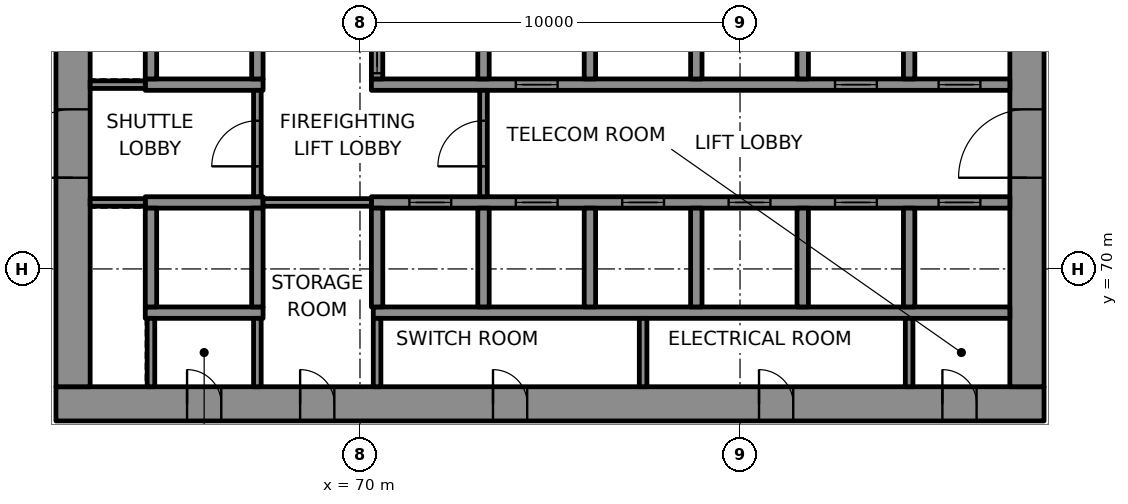
"""IFC4 building model, lengths in metres.
Left out: names, types, materials, properties, quantities, classifications, styles, units other than length and angle.
Written with IfcOpenShell. Run it as: python <this file> out.ifc"""

import sys

from ifc_helpers import new_model, si_unit, direction, frame, frame_2d, origin, place, context, subcontext, project, spatial, rectangle, extrude, element, fill, save


model = new_model("IFC4")
c1 = context("Model", 3, precision=1e-05, world=origin(), true_north=direction((0.0, 1.0)))
c2 = subcontext(c1, "Body", "Model", "MODEL_VIEW")
j1 = project(units=[si_unit("LENGTHUNIT", "METRE"), si_unit("PLANEANGLEUNIT", "RADIAN")], contexts=[c1])
p1 = place(None, origin())
s1 = spatial("IfcSite", under=j1, at=p1, CompositionType="ELEMENT")
p2 = place(p1, origin())
s2 = spatial("IfcBuilding", under=s1, at=p2, CompositionType="ELEMENT")
p3 = place(p2, frame((0.0, 0.0, 136.6)))
s3 = spatial("IfcBuildingStorey", under=s2, at=p3, CompositionType="ELEMENT", Elevation=136.6)
p4 = place(p3, frame((62.0, 66.45, 0.0), z_axis=(0.0, 0.0, 1.0), x_axis=(1.0, 0.0, 0.0)))
e1 = element("IfcWall", 1, at=p4, inside=s3, PredefinedType="SHEAR", context=c2, shape_type="SweptSolid", body=[
    extrude(rectangle(XDim=26.0, YDim=0.9, at=frame_2d((13.0, 0.0))), origin(), (0.0, 0.0, 1.0), 3.9),
])
p5 = place(p4, frame((3.45, 0.0, 0.0)))
e2 = element("IfcOpeningElement", 2, at=p5, cuts=e1, PredefinedType="OPENING", context=c2, shape_type="SweptSolid", body=[
    extrude(rectangle(XDim=0.9, YDim=2.1, at=frame_2d((0.45, 1.05))), frame((0.0, 0.46, 0.0), z_axis=(0.0, -1.0, 0.0), x_axis=(1.0, 0.0, 0.0)), (0.0, 0.0, 1.0), 0.92),
])
p6 = place(p4, frame((6.425, 0.0, 0.0)))
e3 = element("IfcOpeningElement", 3, at=p6, cuts=e1, PredefinedType="OPENING", context=c2, shape_type="SweptSolid", body=[
    extrude(rectangle(XDim=0.9, YDim=2.1, at=frame_2d((0.45, 1.05))), frame((0.0, 0.46, 0.0), z_axis=(0.0, -1.0, 0.0), x_axis=(1.0, 0.0, 0.0)), (0.0, 0.0, 1.0), 0.92),
])
p7 = place(p4, frame((11.5, 0.0, 0.0)))
e4 = element("IfcOpeningElement", 4, at=p7, cuts=e1, PredefinedType="OPENING", context=c2, shape_type="SweptSolid", body=[
    extrude(rectangle(XDim=0.9, YDim=2.1, at=frame_2d((0.45, 1.05))), frame((0.0, 0.46, 0.0), z_axis=(0.0, -1.0, 0.0), x_axis=(1.0, 0.0, 0.0)), (0.0, 0.0, 1.0), 0.92),
])
p8 = place(p4, frame((18.5, 0.0, 0.0)))
e5 = element("IfcOpeningElement", 5, at=p8, cuts=e1, PredefinedType="OPENING", context=c2, shape_type="SweptSolid", body=[
    extrude(rectangle(XDim=0.9, YDim=2.1, at=frame_2d((0.45, 1.05))), frame((0.0, 0.46, 0.0), z_axis=(0.0, -1.0, 0.0), x_axis=(1.0, 0.0, 0.0)), (0.0, 0.0, 1.0), 0.92),
])
p9 = place(p4, frame((23.325, 0.0, 0.0)))
e6 = element("IfcOpeningElement", 6, at=p9, cuts=e1, PredefinedType="OPENING", context=c2, shape_type="SweptSolid", body=[
    extrude(rectangle(XDim=0.9, YDim=2.1, at=frame_2d((0.45, 1.05))), frame((0.0, 0.46, 0.0), z_axis=(0.0, -1.0, 0.0), x_axis=(1.0, 0.0, 0.0)), (0.0, 0.0, 1.0), 0.92),
])
p10 = place(p3, frame((62.45, 66.9, 0.0), z_axis=(0.0, 0.0, 1.0), x_axis=(0.0, 1.0, 0.0)))
e7 = element("IfcWall", 7, at=p10, inside=s3, PredefinedType="SHEAR", context=c2, shape_type="SweptSolid", body=[
    extrude(rectangle(XDim=16.2, YDim=0.9, at=frame_2d((8.1, 0.0))), origin(), (0.0, 0.0, 1.0), 3.9),
])
p11 = place(p10, frame((5.5, 0.0, 0.0)))
e8 = element("IfcOpeningElement", 8, at=p11, cuts=e7, PredefinedType="OPENING", context=c2, shape_type="SweptSolid", body=[
    extrude(rectangle(XDim=1.8, YDim=2.1, at=frame_2d((0.9, 1.05))), frame((0.0, 0.46, 0.0), z_axis=(0.0, -1.0, 0.0), x_axis=(1.0, 0.0, 0.0)), (0.0, 0.0, 1.0), 0.92),
])
p12 = place(p3, frame((87.55, 66.9, 0.0), z_axis=(0.0, 0.0, 1.0), x_axis=(0.0, 1.0, 0.0)))
e9 = element("IfcWall", 9, at=p12, inside=s3, PredefinedType="SHEAR", context=c2, shape_type="SweptSolid", body=[
    extrude(rectangle(XDim=16.2, YDim=0.9, at=frame_2d((8.1, 0.0))), origin(), (0.0, 0.0, 1.0), 3.9),
])
p13 = place(p12, frame((5.5, 0.0, 0.0)))
e10 = element("IfcOpeningElement", 10, at=p13, cuts=e9, PredefinedType="OPENING", context=c2, shape_type="SweptSolid", body=[
    extrude(rectangle(XDim=1.8, YDim=2.1, at=frame_2d((0.9, 1.05))), frame((0.0, 0.46, 0.0), z_axis=(0.0, -1.0, 0.0), x_axis=(1.0, 0.0, 0.0)), (0.0, 0.0, 1.0), 0.92),
])
p14 = place(p12, frame((12.272, 0.0, 0.0)))
e11 = element("IfcOpeningElement", 11, at=p14, cuts=e9, PredefinedType="OPENING", context=c2, shape_type="SweptSolid", body=[
    extrude(rectangle(XDim=0.9, YDim=2.1, at=frame_2d((0.45, 1.05))), frame((0.0, 0.46, 0.0), z_axis=(0.0, -1.0, 0.0), x_axis=(1.0, 0.0, 0.0)), (0.0, 0.0, 1.0), 0.92),
])
p15 = place(p3, frame((64.35, 68.85, 0.0), z_axis=(0.0, 0.0, 1.0), x_axis=(1.0, 0.0, 0.0)))
e12 = element("IfcWall", 12, at=p15, inside=s3, PredefinedType="SHEAR", context=c2, shape_type="SweptSolid", body=[
    extrude(rectangle(XDim=3.1, YDim=0.3, at=frame_2d((1.55, 0.0))), origin(), (0.0, 0.0, 1.0), 3.9),
])
p16 = place(p3, frame((70.35, 68.85, 0.0), z_axis=(0.0, 0.0, 1.0), x_axis=(1.0, 0.0, 0.0)))
e13 = element("IfcWall", 13, at=p16, inside=s3, PredefinedType="SHEAR", context=c2, shape_type="SweptSolid", body=[
    extrude(rectangle(XDim=16.75, YDim=0.3, at=frame_2d((8.375, 0.0))), origin(), (0.0, 0.0, 1.0), 3.9),
])
p17 = place(p3, frame((64.35, 71.75, 0.0), z_axis=(0.0, 0.0, 1.0), x_axis=(1.0, 0.0, 0.0)))
e14 = element("IfcWall", 14, at=p17, inside=s3, PredefinedType="SHEAR", context=c2, shape_type="SweptSolid", body=[
    extrude(rectangle(XDim=3.1, YDim=0.3, at=frame_2d((1.55, 0.0))), origin(), (0.0, 0.0, 1.0), 3.9),
])
p18 = place(p3, frame((70.3, 71.75, 0.0), z_axis=(0.0, 0.0, 1.0), x_axis=(1.0, 0.0, 0.0)))
e15 = element("IfcWall", 15, at=p18, inside=s3, PredefinedType="SHEAR", context=c2, shape_type="SweptSolid", body=[
    extrude(rectangle(XDim=16.8, YDim=0.3, at=frame_2d((8.4, 0.0))), origin(), (0.0, 0.0, 1.0), 3.9),
])
p19 = place(p18, frame((1.0, 0.0, 0.0)))
e16 = element("IfcOpeningElement", 16, at=p19, cuts=e15, PredefinedType="OPENING", context=c2, shape_type="SweptSolid", body=[
    extrude(rectangle(XDim=1.1, YDim=2.1, at=frame_2d((0.55, 1.05))), frame((0.0, 0.16, 0.0), z_axis=(0.0, -1.0, 0.0), x_axis=(1.0, 0.0, 0.0)), (0.0, 0.0, 1.0), 0.32),
])
p20 = place(p18, frame((3.8, 0.0, 0.0)))
e17 = element("IfcOpeningElement", 17, at=p20, cuts=e15, PredefinedType="OPENING", context=c2, shape_type="SweptSolid", body=[
    extrude(rectangle(XDim=1.1, YDim=2.1, at=frame_2d((0.55, 1.05))), frame((0.0, 0.16, 0.0), z_axis=(0.0, -1.0, 0.0), x_axis=(1.0, 0.0, 0.0)), (0.0, 0.0, 1.0), 0.32),
])
p21 = place(p18, frame((6.6, 0.0, 0.0)))
e18 = element("IfcOpeningElement", 18, at=p21, cuts=e15, PredefinedType="OPENING", context=c2, shape_type="SweptSolid", body=[
    extrude(rectangle(XDim=1.1, YDim=2.1, at=frame_2d((0.55, 1.05))), frame((0.0, 0.16, 0.0), z_axis=(0.0, -1.0, 0.0), x_axis=(1.0, 0.0, 0.0)), (0.0, 0.0, 1.0), 0.32),
])
p22 = place(p18, frame((9.4, 0.0, 0.0)))
e19 = element("IfcOpeningElement", 19, at=p22, cuts=e15, PredefinedType="OPENING", context=c2, shape_type="SweptSolid", body=[
    extrude(rectangle(XDim=1.1, YDim=2.1, at=frame_2d((0.55, 1.05))), frame((0.0, 0.16, 0.0), z_axis=(0.0, -1.0, 0.0), x_axis=(1.0, 0.0, 0.0)), (0.0, 0.0, 1.0), 0.32),
])
p23 = place(p18, frame((12.2, 0.0, 0.0)))
e20 = element("IfcOpeningElement", 20, at=p23, cuts=e15, PredefinedType="OPENING", context=c2, shape_type="SweptSolid", body=[
    extrude(rectangle(XDim=1.1, YDim=2.1, at=frame_2d((0.55, 1.05))), frame((0.0, 0.16, 0.0), z_axis=(0.0, -1.0, 0.0), x_axis=(1.0, 0.0, 0.0)), (0.0, 0.0, 1.0), 0.32),
])
p24 = place(p18, frame((14.925, 0.0, 0.0)))
e21 = element("IfcOpeningElement", 21, at=p24, cuts=e15, PredefinedType="OPENING", context=c2, shape_type="SweptSolid", body=[
    extrude(rectangle(XDim=1.1, YDim=2.1, at=frame_2d((0.55, 1.05))), frame((0.0, 0.16, 0.0), z_axis=(0.0, -1.0, 0.0), x_axis=(1.0, 0.0, 0.0)), (0.0, 0.0, 1.0), 0.32),
])
p25 = place(p3, frame((64.35, 74.85, 0.0), z_axis=(0.0, 0.0, 1.0), x_axis=(1.0, 0.0, 0.0)))
e22 = element("IfcWall", 22, at=p25, inside=s3, PredefinedType="SHEAR", context=c2, shape_type="SweptSolid", body=[
    extrude(rectangle(XDim=3.1, YDim=0.3, at=frame_2d((1.55, 0.0))), origin(), (0.0, 0.0, 1.0), 3.9),
])
p26 = place(p3, frame((70.3, 74.85, 0.0), z_axis=(0.0, 0.0, 1.0), x_axis=(1.0, 0.0, 0.0)))
e23 = element("IfcWall", 23, at=p26, inside=s3, PredefinedType="SHEAR", context=c2, shape_type="SweptSolid", body=[
    extrude(rectangle(XDim=16.8, YDim=0.3, at=frame_2d((8.4, 0.0))), origin(), (0.0, 0.0, 1.0), 3.9),
])
p27 = place(p26, frame((3.8, 0.0, 0.0)))
e24 = element("IfcOpeningElement", 24, at=p27, cuts=e23, PredefinedType="OPENING", context=c2, shape_type="SweptSolid", body=[
    extrude(rectangle(XDim=1.1, YDim=2.1, at=frame_2d((0.55, 1.05))), frame((0.0, 0.16, 0.0), z_axis=(0.0, -1.0, 0.0), x_axis=(1.0, 0.0, 0.0)), (0.0, 0.0, 1.0), 0.32),
])
p28 = place(p26, frame((12.2, 0.0, 0.0)))
e25 = element("IfcOpeningElement", 25, at=p28, cuts=e23, PredefinedType="OPENING", context=c2, shape_type="SweptSolid", body=[
    extrude(rectangle(XDim=1.1, YDim=2.1, at=frame_2d((0.55, 1.05))), frame((0.0, 0.16, 0.0), z_axis=(0.0, -1.0, 0.0), x_axis=(1.0, 0.0, 0.0)), (0.0, 0.0, 1.0), 0.32),
])
p29 = place(p26, frame((14.925, 0.0, 0.0)))
e26 = element("IfcOpeningElement", 26, at=p29, cuts=e23, PredefinedType="OPENING", context=c2, shape_type="SweptSolid", body=[
    extrude(rectangle(XDim=1.1, YDim=2.1, at=frame_2d((0.55, 1.05))), frame((0.0, 0.16, 0.0), z_axis=(0.0, -1.0, 0.0), x_axis=(1.0, 0.0, 0.0)), (0.0, 0.0, 1.0), 0.32),
])
for number, where, z_axis, x_axis in (
    (27, (64.5, 69.0, 0.0), (0.0, 0.0, 1.0), (0.0, 1.0, 0.0)),
    (28, (64.5, 75.0, 0.0), (0.0, 0.0, 1.0), (0.0, 1.0, 0.0)),
    (29, (67.3, 69.0, 0.0), (0.0, 0.0, 1.0), (0.0, 1.0, 0.0)),
    (30, (67.3, 75.0, 0.0), (0.0, 0.0, 1.0), (0.0, 1.0, 0.0)),
    (31, (70.45, 69.0, 0.0), (0.0, 0.0, 1.0), (0.0, 1.0, 0.0)),
):
    element("IfcWall", number, at=place(p3, frame(where, z_axis=z_axis, x_axis=x_axis)), inside=s3, PredefinedType="SHEAR", context=c2, shape_type="SweptSolid", body=[
        extrude(rectangle(XDim=2.6, YDim=0.3, at=frame_2d((1.3, 0.0))), origin(), (0.0, 0.0, 1.0), 3.9),
    ])
p30 = place(p3, frame((70.45, 75.0, 0.0), z_axis=(0.0, 0.0, 1.0), x_axis=(0.0, 1.0, 0.0)))
e32 = element("IfcWall", 32, at=p30, inside=s3, PredefinedType="SHEAR", context=c2, shape_type="SweptSolid", body=[
    extrude(rectangle(XDim=2.6, YDim=0.3, at=frame_2d((1.3, 0.0))), origin(), (0.0, 0.0, 1.0), 3.9),
])
p31 = place(p30, frame((0.15, 0.0, 0.0)))
e33 = element("IfcOpeningElement", 33, at=p31, cuts=e32, PredefinedType="OPENING", context=c2, shape_type="SweptSolid", body=[
    extrude(rectangle(XDim=1.1, YDim=2.1, at=frame_2d((0.55, 1.05))), frame((0.0, 0.16, 0.0), z_axis=(0.0, -1.0, 0.0), x_axis=(1.0, 0.0, 0.0)), (0.0, 0.0, 1.0), 0.32),
])
for number, where, z_axis, x_axis in (
    (34, (73.25, 69.0, 0.0), (0.0, 0.0, 1.0), (0.0, 1.0, 0.0)),
    (35, (73.25, 75.0, 0.0), (0.0, 0.0, 1.0), (0.0, 1.0, 0.0)),
    (36, (76.05, 69.0, 0.0), (0.0, 0.0, 1.0), (0.0, 1.0, 0.0)),
    (37, (76.05, 75.0, 0.0), (0.0, 0.0, 1.0), (0.0, 1.0, 0.0)),
    (38, (78.85, 69.0, 0.0), (0.0, 0.0, 1.0), (0.0, 1.0, 0.0)),
    (39, (78.85, 75.0, 0.0), (0.0, 0.0, 1.0), (0.0, 1.0, 0.0)),
    (40, (81.65, 69.0, 0.0), (0.0, 0.0, 1.0), (0.0, 1.0, 0.0)),
    (41, (81.65, 75.0, 0.0), (0.0, 0.0, 1.0), (0.0, 1.0, 0.0)),
    (42, (84.45, 69.0, 0.0), (0.0, 0.0, 1.0), (0.0, 1.0, 0.0)),
    (43, (84.45, 75.0, 0.0), (0.0, 0.0, 1.0), (0.0, 1.0, 0.0)),
):
    element("IfcWall", number, at=place(p3, frame(where, z_axis=z_axis, x_axis=x_axis)), inside=s3, PredefinedType="SHEAR", context=c2, shape_type="SweptSolid", body=[
        extrude(rectangle(XDim=2.6, YDim=0.3, at=frame_2d((1.3, 0.0))), origin(), (0.0, 0.0, 1.0), 3.9),
    ])
p32 = place(p3, frame((62.9, 71.75, 0.0), z_axis=(0.0, 0.0, 1.0), x_axis=(1.0, 0.0, 0.0)))
e44 = element("IfcWall", 44, at=p32, inside=s3, PredefinedType="PARTITIONING", context=c2, shape_type="SweptSolid", body=[
    extrude(rectangle(XDim=1.45, YDim=0.2, at=frame_2d((0.725, 0.0))), origin(), (0.0, 0.0, 1.0), 3.9),
])
p33 = place(p3, frame((67.45, 71.75, 0.0), z_axis=(0.0, 0.0, 1.0), x_axis=(1.0, 0.0, 0.0)))
e45 = element("IfcWall", 45, at=p33, inside=s3, PredefinedType="PARTITIONING", context=c2, shape_type="SweptSolid", body=[
    extrude(rectangle(XDim=2.85, YDim=0.2, at=frame_2d((1.425, 0.0))), origin(), (0.0, 0.0, 1.0), 3.9),
])
p34 = place(p3, frame((62.9, 74.85, 0.0), z_axis=(0.0, 0.0, 1.0), x_axis=(1.0, 0.0, 0.0)))
e46 = element("IfcWall", 46, at=p34, inside=s3, PredefinedType="PARTITIONING", context=c2, shape_type="SweptSolid", body=[
    extrude(rectangle(XDim=1.45, YDim=0.2, at=frame_2d((0.725, 0.0))), origin(), (0.0, 0.0, 1.0), 3.9),
])
for number, where, z_axis, x_axis in (
    (47, (64.5, 66.9, 0.0), (0.0, 0.0, 1.0), (0.0, 1.0, 0.0)),
    (48, (67.3, 66.9, 0.0), (0.0, 0.0, 1.0), (0.0, 1.0, 0.0)),
):
    element("IfcWall", number, at=place(p3, frame(where, z_axis=z_axis, x_axis=x_axis)), inside=s3, PredefinedType="PARTITIONING", context=c2, shape_type="SweptSolid", body=[
        extrude(rectangle(XDim=1.8, YDim=0.2, at=frame_2d((0.9, 0.0))), origin(), (0.0, 0.0, 1.0), 3.9),
    ])
p35 = place(p3, frame((67.3, 71.9, 0.0), z_axis=(0.0, 0.0, 1.0), x_axis=(0.0, 1.0, 0.0)))
e49 = element("IfcWall", 49, at=p35, inside=s3, PredefinedType="PARTITIONING", context=c2, shape_type="SweptSolid", body=[
    extrude(rectangle(XDim=2.8, YDim=0.2, at=frame_2d((1.4, 0.0))), origin(), (0.0, 0.0, 1.0), 3.9),
])
p36 = place(p35, frame((0.8, 0.0, 0.0)))
e50 = element("IfcOpeningElement", 50, at=p36, cuts=e49, PredefinedType="OPENING", context=c2, shape_type="SweptSolid", body=[
    extrude(rectangle(XDim=1.2, YDim=2.1, at=frame_2d((0.6, 1.05))), frame((0.0, 0.11, 0.0), z_axis=(0.0, -1.0, 0.0), x_axis=(1.0, 0.0, 0.0)), (0.0, 0.0, 1.0), 0.22),
])
p37 = place(p3, frame((70.45, 66.9, 0.0), z_axis=(0.0, 0.0, 1.0), x_axis=(0.0, 1.0, 0.0)))
e51 = element("IfcWall", 51, at=p37, inside=s3, PredefinedType="PARTITIONING", context=c2, shape_type="SweptSolid", body=[
    extrude(rectangle(XDim=1.8, YDim=0.2, at=frame_2d((0.9, 0.0))), origin(), (0.0, 0.0, 1.0), 3.9),
])
p38 = place(p3, frame((73.25, 71.9, 0.0), z_axis=(0.0, 0.0, 1.0), x_axis=(0.0, 1.0, 0.0)))
e52 = element("IfcWall", 52, at=p38, inside=s3, PredefinedType="PARTITIONING", context=c2, shape_type="SweptSolid", body=[
    extrude(rectangle(XDim=2.8, YDim=0.2, at=frame_2d((1.4, 0.0))), origin(), (0.0, 0.0, 1.0), 3.9),
])
p39 = place(p38, frame((0.8, 0.0, 0.0)))
e53 = element("IfcOpeningElement", 53, at=p39, cuts=e52, PredefinedType="OPENING", context=c2, shape_type="SweptSolid", body=[
    extrude(rectangle(XDim=1.2, YDim=2.1, at=frame_2d((0.6, 1.05))), frame((0.0, 0.11, 0.0), z_axis=(0.0, -1.0, 0.0), x_axis=(1.0, 0.0, 0.0)), (0.0, 0.0, 1.0), 0.22),
])
for number, where, z_axis, x_axis in (
    (54, (77.45, 66.9, 0.0), (0.0, 0.0, 1.0), (0.0, 1.0, 0.0)),
    (55, (84.45, 66.9, 0.0), (0.0, 0.0, 1.0), (0.0, 1.0, 0.0)),
):
    element("IfcWall", number, at=place(p3, frame(where, z_axis=z_axis, x_axis=x_axis)), inside=s3, PredefinedType="PARTITIONING", context=c2, shape_type="SweptSolid", body=[
        extrude(rectangle(XDim=1.8, YDim=0.2, at=frame_2d((0.9, 0.0))), origin(), (0.0, 0.0, 1.0), 3.9),
    ])
p40 = place(p19, origin())
e56 = element("IfcDoor", 56, at=p40, inside=s3, OperationType="DOUBLE_DOOR_SLIDING", PredefinedType="DOOR", context=c2, shape_type="SweptSolid", body=[
    extrude(rectangle(XDim=1.1, YDim=2.1, at=frame_2d((0.55, 1.05))), frame((0.0, 0.025, 0.0), z_axis=(0.0, -1.0, 0.0), x_axis=(1.0, 0.0, 0.0)), (0.0, 0.0, 1.0), 0.05),
])
fill(e16, e56)
p41 = place(p20, origin())
e57 = element("IfcDoor", 57, at=p41, inside=s3, OperationType="DOUBLE_DOOR_SLIDING", PredefinedType="DOOR", context=c2, shape_type="SweptSolid", body=[
    extrude(rectangle(XDim=1.1, YDim=2.1, at=frame_2d((0.55, 1.05))), frame((0.0, 0.025, 0.0), z_axis=(0.0, -1.0, 0.0), x_axis=(1.0, 0.0, 0.0)), (0.0, 0.0, 1.0), 0.05),
])
fill(e17, e57)
p42 = place(p21, origin())
e58 = element("IfcDoor", 58, at=p42, inside=s3, OperationType="DOUBLE_DOOR_SLIDING", PredefinedType="DOOR", context=c2, shape_type="SweptSolid", body=[
    extrude(rectangle(XDim=1.1, YDim=2.1, at=frame_2d((0.55, 1.05))), frame((0.0, 0.025, 0.0), z_axis=(0.0, -1.0, 0.0), x_axis=(1.0, 0.0, 0.0)), (0.0, 0.0, 1.0), 0.05),
])
fill(e18, e58)
p43 = place(p22, origin())
e59 = element("IfcDoor", 59, at=p43, inside=s3, OperationType="DOUBLE_DOOR_SLIDING", PredefinedType="DOOR", context=c2, shape_type="SweptSolid", body=[
    extrude(rectangle(XDim=1.1, YDim=2.1, at=frame_2d((0.55, 1.05))), frame((0.0, 0.025, 0.0), z_axis=(0.0, -1.0, 0.0), x_axis=(1.0, 0.0, 0.0)), (0.0, 0.0, 1.0), 0.05),
])
fill(e19, e59)
p44 = place(p23, origin())
e60 = element("IfcDoor", 60, at=p44, inside=s3, OperationType="DOUBLE_DOOR_SLIDING", PredefinedType="DOOR", context=c2, shape_type="SweptSolid", body=[
    extrude(rectangle(XDim=1.1, YDim=2.1, at=frame_2d((0.55, 1.05))), frame((0.0, 0.025, 0.0), z_axis=(0.0, -1.0, 0.0), x_axis=(1.0, 0.0, 0.0)), (0.0, 0.0, 1.0), 0.05),
])
fill(e20, e60)
p45 = place(p24, origin())
e61 = element("IfcDoor", 61, at=p45, inside=s3, OperationType="DOUBLE_DOOR_SLIDING", PredefinedType="DOOR", context=c2, shape_type="SweptSolid", body=[
    extrude(rectangle(XDim=1.1, YDim=2.1, at=frame_2d((0.55, 1.05))), frame((0.0, 0.025, 0.0), z_axis=(0.0, -1.0, 0.0), x_axis=(1.0, 0.0, 0.0)), (0.0, 0.0, 1.0), 0.05),
])
fill(e21, e61)
p46 = place(p31, origin())
e62 = element("IfcDoor", 62, at=p46, inside=s3, OperationType="DOUBLE_DOOR_SLIDING", PredefinedType="DOOR", context=c2, shape_type="SweptSolid", body=[
    extrude(rectangle(XDim=1.1, YDim=2.1, at=frame_2d((0.55, 1.05))), frame((0.0, 0.025, 0.0), z_axis=(0.0, -1.0, 0.0), x_axis=(1.0, 0.0, 0.0)), (0.0, 0.0, 1.0), 0.05),
])
fill(e33, e62)
p47 = place(p27, origin())
e63 = element("IfcDoor", 63, at=p47, inside=s3, OperationType="DOUBLE_DOOR_SLIDING", PredefinedType="DOOR", context=c2, shape_type="SweptSolid", body=[
    extrude(rectangle(XDim=1.1, YDim=2.1, at=frame_2d((0.55, 1.05))), frame((0.0, 0.025, 0.0), z_axis=(0.0, -1.0, 0.0), x_axis=(1.0, 0.0, 0.0)), (0.0, 0.0, 1.0), 0.05),
])
fill(e24, e63)
p48 = place(p28, origin())
e64 = element("IfcDoor", 64, at=p48, inside=s3, OperationType="DOUBLE_DOOR_SLIDING", PredefinedType="DOOR", context=c2, shape_type="SweptSolid", body=[
    extrude(rectangle(XDim=1.1, YDim=2.1, at=frame_2d((0.55, 1.05))), frame((0.0, 0.025, 0.0), z_axis=(0.0, -1.0, 0.0), x_axis=(1.0, 0.0, 0.0)), (0.0, 0.0, 1.0), 0.05),
])
fill(e25, e64)
p49 = place(p29, origin())
e65 = element("IfcDoor", 65, at=p49, inside=s3, OperationType="DOUBLE_DOOR_SLIDING", PredefinedType="DOOR", context=c2, shape_type="SweptSolid", body=[
    extrude(rectangle(XDim=1.1, YDim=2.1, at=frame_2d((0.55, 1.05))), frame((0.0, 0.025, 0.0), z_axis=(0.0, -1.0, 0.0), x_axis=(1.0, 0.0, 0.0)), (0.0, 0.0, 1.0), 0.05),
])
fill(e26, e65)
p50 = place(p39, origin())
e66 = element("IfcDoor", 66, at=p50, inside=s3, OperationType="SINGLE_SWING_LEFT", PredefinedType="DOOR", context=c2, shape_type="SweptSolid", body=[
    extrude(rectangle(XDim=1.2, YDim=2.1, at=frame_2d((0.6, 1.05))), frame((0.0, 0.025, 0.0), z_axis=(0.0, -1.0, 0.0), x_axis=(1.0, 0.0, 0.0)), (0.0, 0.0, 1.0), 0.05),
])
fill(e53, e66)
p51 = place(p36, origin())
e67 = element("IfcDoor", 67, at=p51, inside=s3, OperationType="SINGLE_SWING_RIGHT", PredefinedType="DOOR", context=c2, shape_type="SweptSolid", body=[
    extrude(rectangle(XDim=1.2, YDim=2.1, at=frame_2d((0.6, 1.05))), frame((0.0, 0.025, 0.0), z_axis=(0.0, -1.0, 0.0), x_axis=(1.0, 0.0, 0.0)), (0.0, 0.0, 1.0), 0.05),
])
fill(e50, e67)
p52 = place(p11, origin())
e68 = element("IfcDoor", 68, at=p52, inside=s3, OperationType="SINGLE_SWING_LEFT", PredefinedType="DOOR", context=c2, shape_type="SweptSolid", body=[
    extrude(rectangle(XDim=1.8, YDim=2.1, at=frame_2d((0.9, 1.05))), frame((0.0, 0.17, 0.0), z_axis=(0.0, -1.0, 0.0), x_axis=(1.0, 0.0, 0.0)), (0.0, 0.0, 1.0), 0.34),
])
fill(e8, e68)
p53 = place(p13, origin())
e69 = element("IfcDoor", 69, at=p53, inside=s3, OperationType="SINGLE_SWING_RIGHT", PredefinedType="DOOR", context=c2, shape_type="SweptSolid", body=[
    extrude(rectangle(XDim=1.8, YDim=2.1, at=frame_2d((0.9, 1.05))), frame((0.0, 0.17, 0.0), z_axis=(0.0, -1.0, 0.0), x_axis=(1.0, 0.0, 0.0)), (0.0, 0.0, 1.0), 0.34),
])
fill(e10, e69)
p54 = place(p5, origin())
e70 = element("IfcDoor", 70, at=p54, inside=s3, OperationType="SINGLE_SWING_LEFT", PredefinedType="DOOR", context=c2, shape_type="SweptSolid", body=[
    extrude(rectangle(XDim=0.9, YDim=2.1, at=frame_2d((0.45, 1.05))), frame((0.0, 0.17, 0.0), z_axis=(0.0, -1.0, 0.0), x_axis=(1.0, 0.0, 0.0)), (0.0, 0.0, 1.0), 0.34),
])
fill(e2, e70)
p55 = place(p6, origin())
e71 = element("IfcDoor", 71, at=p55, inside=s3, OperationType="SINGLE_SWING_RIGHT", PredefinedType="DOOR", context=c2, shape_type="SweptSolid", body=[
    extrude(rectangle(XDim=0.9, YDim=2.1, at=frame_2d((0.45, 1.05))), frame((0.0, 0.17, 0.0), z_axis=(0.0, -1.0, 0.0), x_axis=(1.0, 0.0, 0.0)), (0.0, 0.0, 1.0), 0.34),
])
fill(e3, e71)
p56 = place(p7, origin())
e72 = element("IfcDoor", 72, at=p56, inside=s3, OperationType="SINGLE_SWING_LEFT", PredefinedType="DOOR", context=c2, shape_type="SweptSolid", body=[
    extrude(rectangle(XDim=0.9, YDim=2.1, at=frame_2d((0.45, 1.05))), frame((0.0, 0.17, 0.0), z_axis=(0.0, -1.0, 0.0), x_axis=(1.0, 0.0, 0.0)), (0.0, 0.0, 1.0), 0.34),
])
fill(e4, e72)
p57 = place(p8, origin())
e73 = element("IfcDoor", 73, at=p57, inside=s3, OperationType="SINGLE_SWING_RIGHT", PredefinedType="DOOR", context=c2, shape_type="SweptSolid", body=[
    extrude(rectangle(XDim=0.9, YDim=2.1, at=frame_2d((0.45, 1.05))), frame((0.0, 0.17, 0.0), z_axis=(0.0, -1.0, 0.0), x_axis=(1.0, 0.0, 0.0)), (0.0, 0.0, 1.0), 0.34),
])
fill(e5, e73)
p58 = place(p9, origin())
e74 = element("IfcDoor", 74, at=p58, inside=s3, OperationType="SINGLE_SWING_LEFT", PredefinedType="DOOR", context=c2, shape_type="SweptSolid", body=[
    extrude(rectangle(XDim=0.9, YDim=2.1, at=frame_2d((0.45, 1.05))), frame((0.0, 0.17, 0.0), z_axis=(0.0, -1.0, 0.0), x_axis=(1.0, 0.0, 0.0)), (0.0, 0.0, 1.0), 0.34),
])
fill(e6, e74)
save(model, sys.argv[1])
